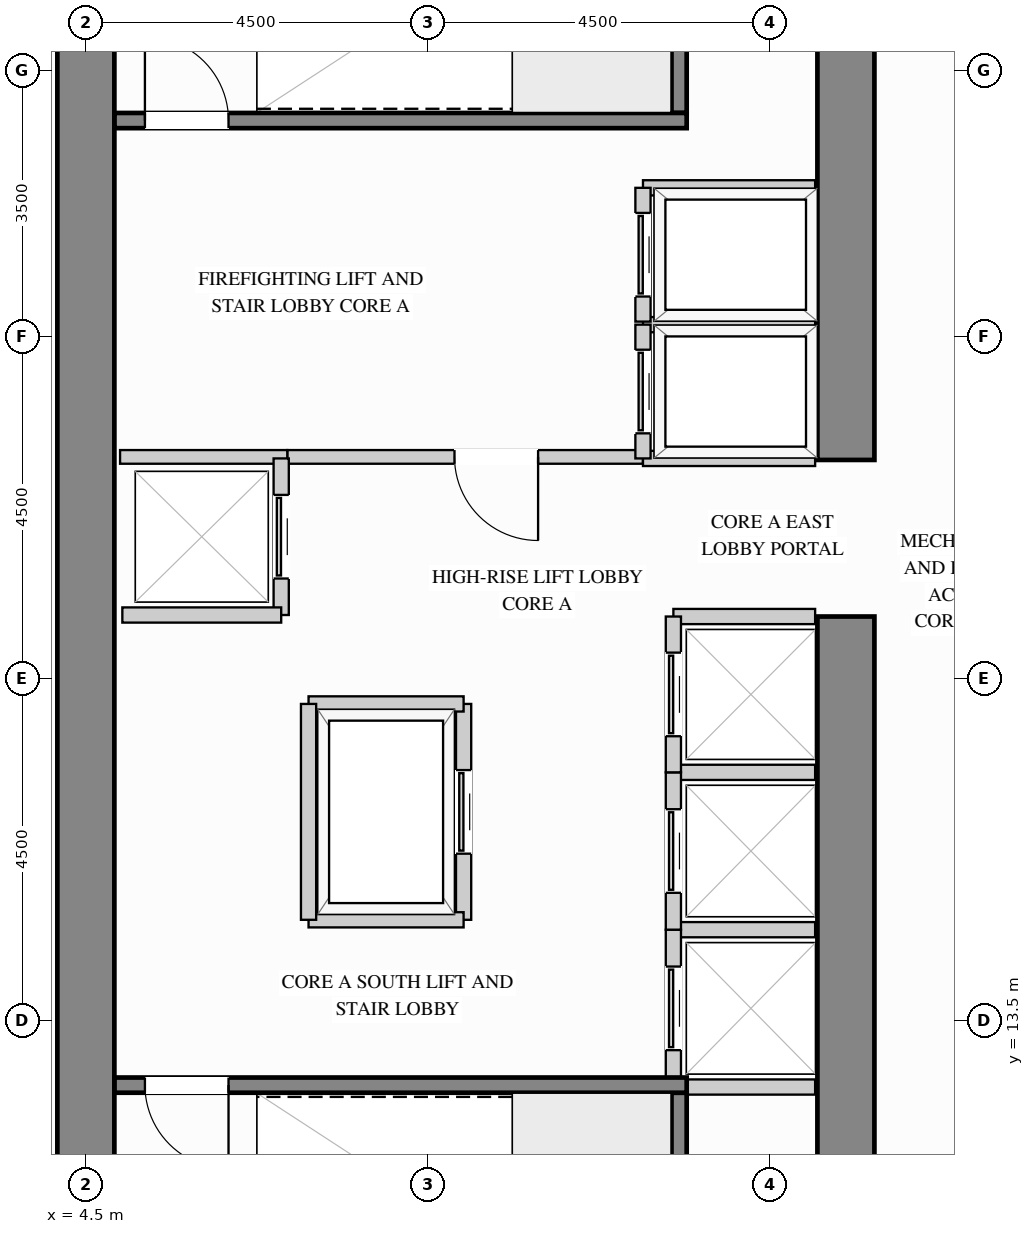
"""IFC4 building model, lengths in metres.
Left out: names, types, materials, properties, quantities, classifications, styles, units other than length and angle.
Written with IfcOpenShell. Run it as: python <this file> out.ifc"""

import sys

from ifc_helpers import new_model, si_unit, direction, frame, frame_2d, origin, place, context, subcontext, project, spatial, rectangle, extrude, source, transform, mapped, element, fill, save


model = new_model("IFC4")
c1 = context("Model", 3, precision=1e-05, world=origin(), true_north=direction((0.0, 1.0)))
c2 = subcontext(c1, "Body", "Model", "MODEL_VIEW")
j1 = project(units=[si_unit("LENGTHUNIT", "METRE"), si_unit("PLANEANGLEUNIT", "RADIAN")], contexts=[c1])
p1 = place(None, origin())
s1 = spatial("IfcSite", under=j1, at=p1, CompositionType="ELEMENT")
p2 = place(p1, origin())
s2 = spatial("IfcBuilding", under=s1, at=p2, CompositionType="ELEMENT")
p3 = place(p2, frame((0.0, 0.0, 138.6)))
s3 = spatial("IfcBuildingStorey", under=s2, at=p3, CompositionType="ELEMENT", Elevation=138.6)
m1 = source(origin(), c2, "Body", "SweptSolid", [
    extrude(rectangle(XDim=9.945, YDim=0.75, at=frame_2d((4.973, 0.0))), origin(), (0.0, 0.0, 1.0), 4.26),
])
p4 = place(p3, frame((14.5, 8.875, 0.0), z_axis=(0.0, 0.0, 1.0), x_axis=(0.0, 1.0, 0.0)))
e1 = element("IfcWall", 1, at=p4, inside=s3, PredefinedType="SHEAR", context=c2, shape_type="MappedRepresentation", body=[
    mapped(m1, transform((0.0, 0.0, 0.0), x_axis=(1.0, 0.0, 0.0), y_axis=(0.0, 1.0, 0.0), z_axis=(0.0, 0.0, 1.0))),
])
m2 = source(origin(), c2, "Body", "SweptSolid", [
    extrude(rectangle(XDim=8.245, YDim=0.75, at=frame_2d((4.123, 0.0))), origin(), (0.0, 0.0, 1.0), 4.26),
])
p5 = place(p3, frame((14.5, 20.88, 0.0), z_axis=(0.0, 0.0, 1.0), x_axis=(0.0, 1.0, 0.0)))
e2 = element("IfcWall", 2, at=p5, inside=s3, PredefinedType="SHEAR", context=c2, shape_type="MappedRepresentation", body=[
    mapped(m2, transform((0.0, 0.0, 0.0), x_axis=(1.0, 0.0, 0.0), y_axis=(0.0, 1.0, 0.0), z_axis=(0.0, 0.0, 1.0))),
])
m3 = source(origin(), c2, "Body", "SweptSolid", [
    extrude(rectangle(XDim=20.25, YDim=0.75, at=frame_2d((10.125, 0.0))), origin(), (0.0, 0.0, 1.0), 4.26),
])
p6 = place(p3, frame((4.5, 8.875, 0.0), z_axis=(0.0, 0.0, 1.0), x_axis=(0.0, 1.0, 0.0)))
e3 = element("IfcWall", 3, at=p6, inside=s3, PredefinedType="SHEAR", context=c2, shape_type="MappedRepresentation", body=[
    mapped(m3, transform((0.0, 0.0, 0.0), x_axis=(1.0, 0.0, 0.0), y_axis=(0.0, 1.0, 0.0), z_axis=(0.0, 0.0, 1.0))),
])
p7 = place(p3, frame((7.15, 20.92, 0.0), z_axis=(0.0, 0.0, 1.0), x_axis=(1.0, 0.0, 0.0)))
e4 = element("IfcWall", 4, at=p7, inside=s3, PredefinedType="PARTITIONING", context=c2, shape_type="SweptSolid", body=[
    extrude(rectangle(XDim=4.68, YDim=0.18, at=frame_2d((2.34, 0.0))), origin(), (0.0, 0.0, 1.0), 4.245),
])
p8 = place(p7, frame((2.2, 0.0, 0.0)))
e5 = element("IfcOpeningElement", 5, at=p8, cuts=e4, PredefinedType="OPENING", context=c2, shape_type="SweptSolid", body=[
    extrude(rectangle(XDim=1.1, YDim=2.15, at=frame_2d((0.55, 1.075))), frame((0.0, 0.1, 0.0), z_axis=(0.0, -1.0, 0.0), x_axis=(1.0, 0.0, 0.0)), (0.0, 0.0, 1.0), 0.2),
])
m4 = source(origin(), c2, "Body", "SweptSolid", [
    extrude(rectangle(XDim=2.2, YDim=0.18, at=frame_2d((1.1, 0.0))), origin(), (0.0, 0.0, 1.0), 4.245),
])
p9 = place(p3, frame((4.95, 20.92, 0.0), z_axis=(0.0, 0.0, 1.0), x_axis=(1.0, 0.0, 0.0)))
e6 = element("IfcWall", 6, at=p9, inside=s3, PredefinedType="PARTITIONING", context=c2, shape_type="MappedRepresentation", body=[
    mapped(m4, transform((0.0, 0.0, 0.0), x_axis=(1.0, 0.0, 0.0), y_axis=(0.0, 1.0, 0.0), z_axis=(0.0, 0.0, 1.0))),
])
m5 = source(origin(), c2, "Body", "SweptSolid", [
    extrude(rectangle(XDim=2.265, YDim=0.2, at=frame_2d((1.132, 0.0))), origin(), (0.0, 0.0, 1.0), 4.245),
])
for number, where, z_axis, x_axis in (
    (7, (11.83, 22.66, 0.0), (0.0, 0.0, 1.0), (1.0, 0.0, 0.0)),
    (8, (11.83, 20.9, 0.0), (0.0, 0.0, 1.0), (1.0, 0.0, 0.0)),
):
    element("IfcWall", number, at=place(p3, frame(where, z_axis=z_axis, x_axis=x_axis)), inside=s3, PredefinedType="PARTITIONING", context=c2, shape_type="MappedRepresentation", body=[
        mapped(m5, transform((0.0, 0.0, 0.0), x_axis=(1.0, 0.0, 0.0), y_axis=(0.0, 1.0, 0.0), z_axis=(0.0, 0.0, 1.0))),
    ])
p10 = place(p3, frame((11.83, 20.9, 0.0), z_axis=(0.0, 0.0, 1.0), x_axis=(0.0, 1.0, 0.0)))
e9 = element("IfcWall", 9, at=p10, inside=s3, PredefinedType="PARTITIONING", context=c2, shape_type="SweptSolid", body=[
    extrude(rectangle(XDim=1.76, YDim=0.2, at=frame_2d((0.88, 0.0))), origin(), (0.0, 0.0, 1.0), 4.245),
])
p11 = place(p10, frame((0.33, 0.0, 0.0)))
e10 = element("IfcOpeningElement", 10, at=p11, cuts=e9, PredefinedType="OPENING", context=c2, shape_type="SweptSolid", body=[
    extrude(rectangle(XDim=1.1, YDim=2.2, at=frame_2d((0.55, 1.1))), frame((0.0, 0.11, 0.0), z_axis=(0.0, -1.0, 0.0), x_axis=(1.0, 0.0, 0.0)), (0.0, 0.0, 1.0), 0.22),
])
p12 = place(p3, frame((11.83, 24.46, 0.0), z_axis=(0.0, 0.0, 1.0), x_axis=(1.0, 0.0, 0.0)))
e11 = element("IfcWall", 11, at=p12, inside=s3, PredefinedType="PARTITIONING", context=c2, shape_type="MappedRepresentation", body=[
    mapped(m5, transform((0.0, 0.0, 0.0), x_axis=(1.0, 0.0, 0.0), y_axis=(0.0, 1.0, 0.0), z_axis=(0.0, 0.0, 1.0))),
])
p13 = place(p3, frame((11.83, 22.7, 0.0), z_axis=(0.0, 0.0, 1.0), x_axis=(0.0, 1.0, 0.0)))
e12 = element("IfcWall", 12, at=p13, inside=s3, PredefinedType="PARTITIONING", context=c2, shape_type="SweptSolid", body=[
    extrude(rectangle(XDim=1.76, YDim=0.2, at=frame_2d((0.88, 0.0))), origin(), (0.0, 0.0, 1.0), 4.245),
])
p14 = place(p13, frame((0.33, 0.0, 0.0)))
e13 = element("IfcOpeningElement", 13, at=p14, cuts=e12, PredefinedType="OPENING", context=c2, shape_type="SweptSolid", body=[
    extrude(rectangle(XDim=1.1, YDim=2.2, at=frame_2d((0.55, 1.1))), frame((0.0, 0.11, 0.0), z_axis=(0.0, -1.0, 0.0), x_axis=(1.0, 0.0, 0.0)), (0.0, 0.0, 1.0), 0.22),
])
m6 = source(origin(), c2, "Body", "SweptSolid", [
    extrude(rectangle(XDim=1.865, YDim=0.2, at=frame_2d((0.933, 0.0))), origin(), (0.0, 0.0, 1.0), 4.245),
])
for number, where, z_axis, x_axis in (
    (14, (12.23, 14.7, 0.0), (0.0, 0.0, 1.0), (1.0, 0.0, 0.0)),
    (15, (12.23, 12.63, 0.0), (0.0, 0.0, 1.0), (1.0, 0.0, 0.0)),
):
    element("IfcWall", number, at=place(p3, frame(where, z_axis=z_axis, x_axis=x_axis)), inside=s3, PredefinedType="PARTITIONING", context=c2, shape_type="MappedRepresentation", body=[
        mapped(m6, transform((0.0, 0.0, 0.0), x_axis=(1.0, 0.0, 0.0), y_axis=(0.0, 1.0, 0.0), z_axis=(0.0, 0.0, 1.0))),
    ])
p15 = place(p3, frame((12.23, 12.63, 0.0), z_axis=(0.0, 0.0, 1.0), x_axis=(0.0, 1.0, 0.0)))
e16 = element("IfcWall", 16, at=p15, inside=s3, PredefinedType="PARTITIONING", context=c2, shape_type="SweptSolid", body=[
    extrude(rectangle(XDim=2.07, YDim=0.2, at=frame_2d((1.035, 0.0))), origin(), (0.0, 0.0, 1.0), 4.245),
])
p16 = place(p15, frame((0.485, 0.0, 0.0)))
e17 = element("IfcOpeningElement", 17, at=p16, cuts=e16, PredefinedType="OPENING", context=c2, shape_type="SweptSolid", body=[
    extrude(rectangle(XDim=1.1, YDim=2.2, at=frame_2d((0.55, 1.1))), frame((0.0, 0.11, 0.0), z_axis=(0.0, -1.0, 0.0), x_axis=(1.0, 0.0, 0.0)), (0.0, 0.0, 1.0), 0.22),
])
p17 = place(p3, frame((12.23, 16.77, 0.0), z_axis=(0.0, 0.0, 1.0), x_axis=(1.0, 0.0, 0.0)))
e18 = element("IfcWall", 18, at=p17, inside=s3, PredefinedType="PARTITIONING", context=c2, shape_type="MappedRepresentation", body=[
    mapped(m6, transform((0.0, 0.0, 0.0), x_axis=(1.0, 0.0, 0.0), y_axis=(0.0, 1.0, 0.0), z_axis=(0.0, 0.0, 1.0))),
])
p18 = place(p3, frame((12.23, 14.7, 0.0), z_axis=(0.0, 0.0, 1.0), x_axis=(0.0, 1.0, 0.0)))
e19 = element("IfcWall", 19, at=p18, inside=s3, PredefinedType="PARTITIONING", context=c2, shape_type="SweptSolid", body=[
    extrude(rectangle(XDim=2.07, YDim=0.2, at=frame_2d((1.035, 0.0))), origin(), (0.0, 0.0, 1.0), 4.245),
])
p19 = place(p18, frame((0.485, 0.0, 0.0)))
e20 = element("IfcOpeningElement", 20, at=p19, cuts=e19, PredefinedType="OPENING", context=c2, shape_type="SweptSolid", body=[
    extrude(rectangle(XDim=1.1, YDim=2.2, at=frame_2d((0.55, 1.1))), frame((0.0, 0.11, 0.0), z_axis=(0.0, -1.0, 0.0), x_axis=(1.0, 0.0, 0.0)), (0.0, 0.0, 1.0), 0.22),
])
p20 = place(p3, frame((12.23, 18.82, 0.0), z_axis=(0.0, 0.0, 1.0), x_axis=(1.0, 0.0, 0.0)))
e21 = element("IfcWall", 21, at=p20, inside=s3, PredefinedType="PARTITIONING", context=c2, shape_type="MappedRepresentation", body=[
    mapped(m6, transform((0.0, 0.0, 0.0), x_axis=(1.0, 0.0, 0.0), y_axis=(0.0, 1.0, 0.0), z_axis=(0.0, 0.0, 1.0))),
])
p21 = place(p3, frame((12.23, 16.77, 0.0), z_axis=(0.0, 0.0, 1.0), x_axis=(0.0, 1.0, 0.0)))
e22 = element("IfcWall", 22, at=p21, inside=s3, PredefinedType="PARTITIONING", context=c2, shape_type="SweptSolid", body=[
    extrude(rectangle(XDim=2.05, YDim=0.2, at=frame_2d((1.025, 0.0))), origin(), (0.0, 0.0, 1.0), 4.245),
])
p22 = place(p21, frame((0.475, 0.0, 0.0)))
e23 = element("IfcOpeningElement", 23, at=p22, cuts=e22, PredefinedType="OPENING", context=c2, shape_type="SweptSolid", body=[
    extrude(rectangle(XDim=1.1, YDim=2.2, at=frame_2d((0.55, 1.1))), frame((0.0, 0.11, 0.0), z_axis=(0.0, -1.0, 0.0), x_axis=(1.0, 0.0, 0.0)), (0.0, 0.0, 1.0), 0.22),
])
p23 = place(p3, frame((7.07, 18.84, 0.0), z_axis=(0.0, 0.0, 1.0), x_axis=(0.0, 1.0, 0.0)))
e24 = element("IfcWall", 24, at=p23, inside=s3, PredefinedType="PARTITIONING", context=c2, shape_type="SweptSolid", body=[
    extrude(rectangle(XDim=2.06, YDim=0.2, at=frame_2d((1.03, 0.0))), origin(), (0.0, 0.0, 1.0), 4.245),
])
p24 = place(p23, frame((0.48, 0.0, 0.0)))
e25 = element("IfcOpeningElement", 25, at=p24, cuts=e24, PredefinedType="OPENING", context=c2, shape_type="SweptSolid", body=[
    extrude(rectangle(XDim=1.1, YDim=2.2, at=frame_2d((0.55, 1.1))), frame((0.0, 0.11, 0.0), z_axis=(0.0, -1.0, 0.0), x_axis=(1.0, 0.0, 0.0)), (0.0, 0.0, 1.0), 0.22),
])
m7 = source(origin(), c2, "Body", "SweptSolid", [
    extrude(rectangle(XDim=2.09, YDim=0.2, at=frame_2d((1.045, 0.0))), origin(), (0.0, 0.0, 1.0), 4.245),
])
p25 = place(p3, frame((4.98, 18.84, 0.0), z_axis=(0.0, 0.0, 1.0), x_axis=(1.0, 0.0, 0.0)))
e26 = element("IfcWall", 26, at=p25, inside=s3, PredefinedType="PARTITIONING", context=c2, shape_type="MappedRepresentation", body=[
    mapped(m7, transform((0.0, 0.0, 0.0), x_axis=(1.0, 0.0, 0.0), y_axis=(0.0, 1.0, 0.0), z_axis=(0.0, 0.0, 1.0))),
])
p26 = place(p3, frame((9.47, 14.83, 0.0), z_axis=(0.0, 0.0, 1.0), x_axis=(0.0, 1.0, 0.0)))
e27 = element("IfcWall", 27, at=p26, inside=s3, PredefinedType="PARTITIONING", context=c2, shape_type="SweptSolid", body=[
    extrude(rectangle(XDim=2.84, YDim=0.2, at=frame_2d((1.42, 0.0))), origin(), (0.0, 0.0, 1.0), 4.245),
])
p27 = place(p26, frame((0.87, 0.0, 0.0)))
e28 = element("IfcOpeningElement", 28, at=p27, cuts=e27, PredefinedType="OPENING", context=c2, shape_type="SweptSolid", body=[
    extrude(rectangle(XDim=1.1, YDim=2.2, at=frame_2d((0.55, 1.1))), frame((0.0, 0.11, 0.0), z_axis=(0.0, -1.0, 0.0), x_axis=(1.0, 0.0, 0.0)), (0.0, 0.0, 1.0), 0.22),
])
m8 = source(origin(), c2, "Body", "SweptSolid", [
    extrude(rectangle(XDim=2.04, YDim=0.2, at=frame_2d((1.02, 0.0))), origin(), (0.0, 0.0, 1.0), 4.245),
])
for number, where, z_axis, x_axis in (
    (29, (7.43, 17.67, 0.0), (0.0, 0.0, 1.0), (1.0, 0.0, 0.0)),
    (30, (7.43, 14.83, 0.0), (0.0, 0.0, 1.0), (1.0, 0.0, 0.0)),
):
    element("IfcWall", number, at=place(p3, frame(where, z_axis=z_axis, x_axis=x_axis)), inside=s3, PredefinedType="PARTITIONING", context=c2, shape_type="MappedRepresentation", body=[
        mapped(m8, transform((0.0, 0.0, 0.0), x_axis=(1.0, 0.0, 0.0), y_axis=(0.0, 1.0, 0.0), z_axis=(0.0, 0.0, 1.0))),
    ])
m9 = source(origin(), c2, "Body", "SweptSolid", [
    extrude(rectangle(XDim=2.84, YDim=0.2, at=frame_2d((1.42, 0.0))), origin(), (0.0, 0.0, 1.0), 4.245),
])
p28 = place(p3, frame((7.43, 14.83, 0.0), z_axis=(0.0, 0.0, 1.0), x_axis=(0.0, 1.0, 0.0)))
e31 = element("IfcWall", 31, at=p28, inside=s3, PredefinedType="PARTITIONING", context=c2, shape_type="MappedRepresentation", body=[
    mapped(m9, transform((0.0, 0.0, 0.0), x_axis=(1.0, 0.0, 0.0), y_axis=(0.0, 1.0, 0.0), z_axis=(0.0, 0.0, 1.0))),
])
m10 = source(origin(), c2, "Body", "SweptSolid", [
    extrude(rectangle(XDim=3.678, YDim=0.2, at=frame_2d((1.839, 0.0))), origin(), (0.0, 0.0, 1.0), 4.26),
])
p29 = place(p3, frame((12.305, 8.877, 0.0), z_axis=(0.0, 0.0, 1.0), x_axis=(0.0, 1.0, 0.0)))
e32 = element("IfcWall", 32, at=p29, inside=s3, PredefinedType="SHEAR", context=c2, shape_type="MappedRepresentation", body=[
    mapped(m10, transform((0.0, 0.0, 0.0), x_axis=(1.0, 0.0, 0.0), y_axis=(0.0, 1.0, 0.0), z_axis=(0.0, 0.0, 1.0))),
])
p30 = place(p3, frame((4.877, 12.655, 0.0), z_axis=(0.0, 0.0, 1.0), x_axis=(1.0, 0.0, 0.0)))
e33 = element("IfcWall", 33, at=p30, inside=s3, PredefinedType="SHEAR", context=c2, shape_type="SweptSolid", body=[
    extrude(rectangle(XDim=7.528, YDim=0.2, at=frame_2d((3.764, 0.0))), origin(), (0.0, 0.0, 1.0), 4.26),
])
p31 = place(p30, frame((0.4, 0.0, 0.0)))
e34 = element("IfcOpeningElement", 34, at=p31, cuts=e33, PredefinedType="OPENING", context=c2, shape_type="SweptSolid", body=[
    extrude(rectangle(XDim=1.1, YDim=2.15, at=frame_2d((0.55, 1.075))), frame((0.0, 0.11, 0.0), z_axis=(0.0, -1.0, 0.0), x_axis=(1.0, 0.0, 0.0)), (0.0, 0.0, 1.0), 0.22),
])
p32 = place(p3, frame((12.305, 25.445, 0.0), z_axis=(0.0, 0.0, 1.0), x_axis=(0.0, 1.0, 0.0)))
e35 = element("IfcWall", 35, at=p32, inside=s3, PredefinedType="SHEAR", context=c2, shape_type="MappedRepresentation", body=[
    mapped(m10, transform((0.0, 0.0, 0.0), x_axis=(1.0, 0.0, 0.0), y_axis=(0.0, 1.0, 0.0), z_axis=(0.0, 0.0, 1.0))),
])
p33 = place(p3, frame((4.877, 25.345, 0.0), z_axis=(0.0, 0.0, 1.0), x_axis=(1.0, 0.0, 0.0)))
e36 = element("IfcWall", 36, at=p33, inside=s3, PredefinedType="SHEAR", context=c2, shape_type="SweptSolid", body=[
    extrude(rectangle(XDim=7.528, YDim=0.2, at=frame_2d((3.764, 0.0))), origin(), (0.0, 0.0, 1.0), 4.26),
])
p34 = place(p33, frame((0.4, 0.0, 0.0)))
e37 = element("IfcOpeningElement", 37, at=p34, cuts=e36, PredefinedType="OPENING", context=c2, shape_type="SweptSolid", body=[
    extrude(rectangle(XDim=1.1, YDim=2.15, at=frame_2d((0.55, 1.075))), frame((0.0, 0.11, 0.0), z_axis=(0.0, -1.0, 0.0), x_axis=(1.0, 0.0, 0.0)), (0.0, 0.0, 1.0), 0.22),
])
m11 = source(origin(), c2, "Body", "SweptSolid", [
    extrude(rectangle(XDim=1.1, YDim=2.15, at=frame_2d((0.55, 1.075))), frame((0.0, 0.025, 0.0), z_axis=(0.0, -1.0, 0.0), x_axis=(1.0, 0.0, 0.0)), (0.0, 0.0, 1.0), 0.05),
])
p35 = place(p8, origin())
e38 = element("IfcDoor", 38, at=p35, inside=s3, OperationType="SINGLE_SWING_RIGHT", PredefinedType="DOOR", context=c2, shape_type="MappedRepresentation", body=[
    mapped(m11, transform((0.0, 0.0, 0.0), x_axis=(1.0, 0.0, 0.0), y_axis=(0.0, 1.0, 0.0), z_axis=(0.0, 0.0, 1.0))),
])
fill(e5, e38)
m12 = source(origin(), c2, "Body", "SweptSolid", [
    extrude(rectangle(XDim=1.1, YDim=2.2, at=frame_2d((0.55, 1.1))), frame((0.0, 0.025, 0.0), z_axis=(0.0, -1.0, 0.0), x_axis=(1.0, 0.0, 0.0)), (0.0, 0.0, 1.0), 0.05),
])
p36 = place(p11, origin())
e39 = element("IfcDoor", 39, at=p36, inside=s3, OperationType="SLIDING_TO_LEFT", PredefinedType="DOOR", context=c2, shape_type="MappedRepresentation", body=[
    mapped(m12, transform((0.0, 0.0, 0.0), x_axis=(1.0, 0.0, 0.0), y_axis=(0.0, 1.0, 0.0), z_axis=(0.0, 0.0, 1.0))),
])
fill(e10, e39)
p37 = place(p14, origin())
e40 = element("IfcDoor", 40, at=p37, inside=s3, OperationType="SLIDING_TO_LEFT", PredefinedType="DOOR", context=c2, shape_type="MappedRepresentation", body=[
    mapped(m12, transform((0.0, 0.0, 0.0), x_axis=(1.0, 0.0, 0.0), y_axis=(0.0, 1.0, 0.0), z_axis=(0.0, 0.0, 1.0))),
])
fill(e13, e40)
p38 = place(p16, origin())
e41 = element("IfcDoor", 41, at=p38, inside=s3, OperationType="SLIDING_TO_LEFT", PredefinedType="DOOR", context=c2, shape_type="MappedRepresentation", body=[
    mapped(m12, transform((0.0, 0.0, 0.0), x_axis=(1.0, 0.0, 0.0), y_axis=(0.0, 1.0, 0.0), z_axis=(0.0, 0.0, 1.0))),
])
fill(e17, e41)
p39 = place(p19, origin())
e42 = element("IfcDoor", 42, at=p39, inside=s3, OperationType="SLIDING_TO_LEFT", PredefinedType="DOOR", context=c2, shape_type="MappedRepresentation", body=[
    mapped(m12, transform((0.0, 0.0, 0.0), x_axis=(1.0, 0.0, 0.0), y_axis=(0.0, 1.0, 0.0), z_axis=(0.0, 0.0, 1.0))),
])
fill(e20, e42)
p40 = place(p22, origin())
e43 = element("IfcDoor", 43, at=p40, inside=s3, OperationType="SLIDING_TO_LEFT", PredefinedType="DOOR", context=c2, shape_type="MappedRepresentation", body=[
    mapped(m12, transform((0.0, 0.0, 0.0), x_axis=(1.0, 0.0, 0.0), y_axis=(0.0, 1.0, 0.0), z_axis=(0.0, 0.0, 1.0))),
])
fill(e23, e43)
p41 = place(p24, origin())
e44 = element("IfcDoor", 44, at=p41, inside=s3, OperationType="SLIDING_TO_LEFT", PredefinedType="DOOR", context=c2, shape_type="MappedRepresentation", body=[
    mapped(m12, transform((0.0, 0.0, 0.0), x_axis=(1.0, 0.0, 0.0), y_axis=(0.0, 1.0, 0.0), z_axis=(0.0, 0.0, 1.0))),
])
fill(e25, e44)
p42 = place(p27, origin())
e45 = element("IfcDoor", 45, at=p42, inside=s3, OperationType="SLIDING_TO_LEFT", PredefinedType="DOOR", context=c2, shape_type="MappedRepresentation", body=[
    mapped(m12, transform((0.0, 0.0, 0.0), x_axis=(1.0, 0.0, 0.0), y_axis=(0.0, 1.0, 0.0), z_axis=(0.0, 0.0, 1.0))),
])
fill(e28, e45)
m13 = source(origin(), c2, "Body", "SweptSolid", [
    extrude(rectangle(XDim=1.1, YDim=2.15, at=frame_2d((0.55, 1.075))), frame((0.0, 0.025, 0.0), z_axis=(0.0, -1.0, 0.0), x_axis=(1.0, 0.0, 0.0)), (0.0, 0.0, 1.0), 0.05),
])
p43 = place(p31, origin())
e46 = element("IfcDoor", 46, at=p43, inside=s3, OperationType="SINGLE_SWING_RIGHT", PredefinedType="DOOR", context=c2, shape_type="MappedRepresentation", body=[
    mapped(m13, transform((0.0, 0.0, 0.0), x_axis=(1.0, 0.0, 0.0), y_axis=(0.0, 1.0, 0.0), z_axis=(0.0, 0.0, 1.0))),
])
fill(e34, e46)
p44 = place(p34, origin())
e47 = element("IfcDoor", 47, at=p44, inside=s3, OperationType="SINGLE_SWING_LEFT", PredefinedType="DOOR", context=c2, shape_type="MappedRepresentation", body=[
    mapped(m13, transform((0.0, 0.0, 0.0), x_axis=(1.0, 0.0, 0.0), y_axis=(0.0, 1.0, 0.0), z_axis=(0.0, 0.0, 1.0))),
])
fill(e37, e47)
save(model, sys.argv[1])
